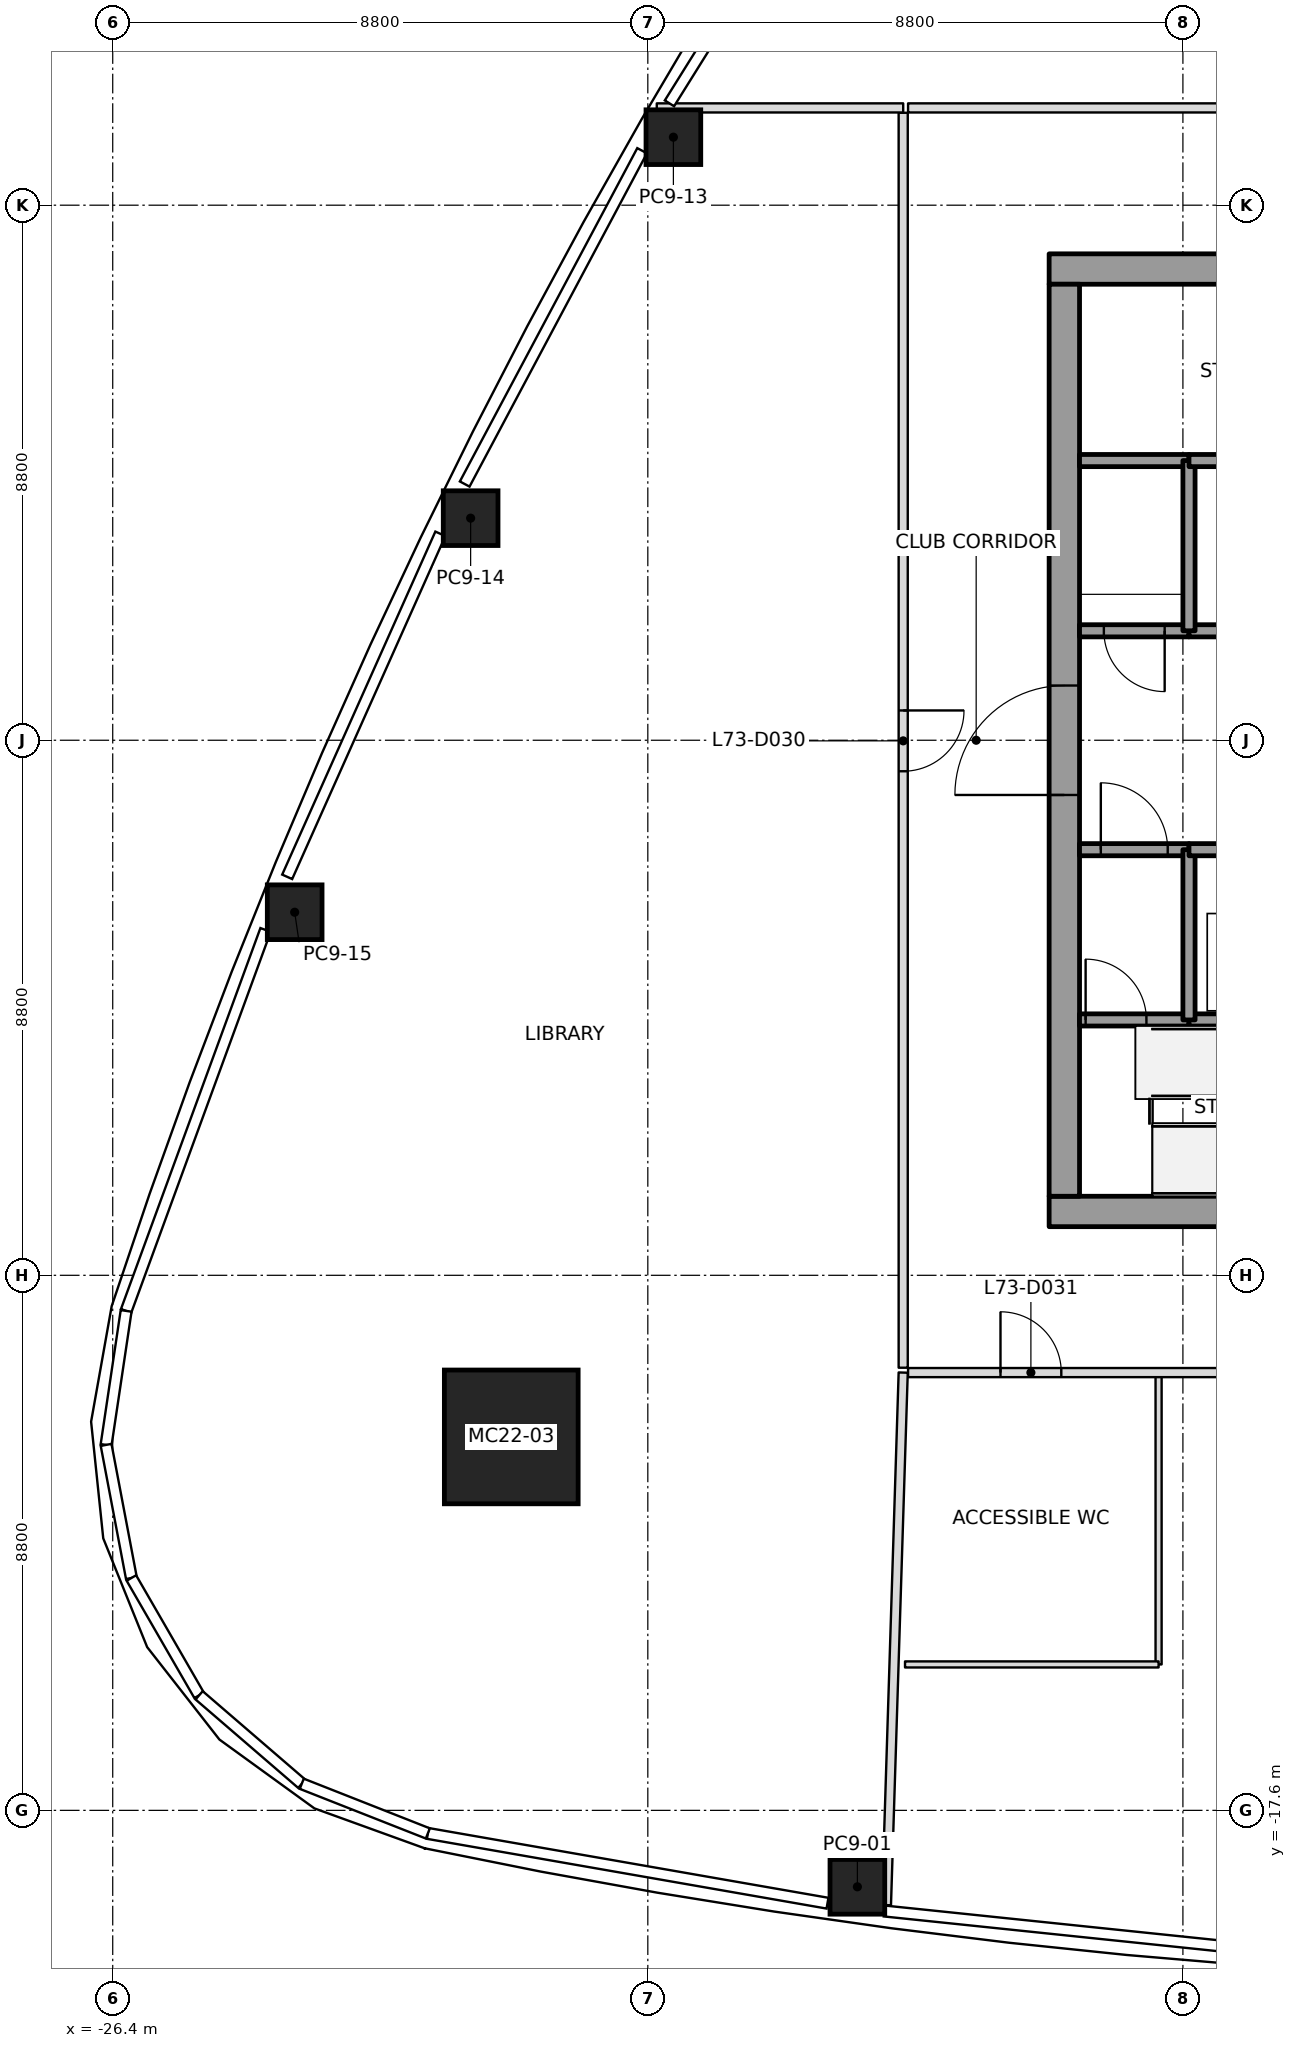
"""IFC4 building model, lengths in metres.
Left out: names, types, materials, properties, quantities, classifications, styles, units other than length and angle.
Written with IfcOpenShell. Run it as: python <this file> out.ifc"""

import sys

from ifc_helpers import new_model, si_unit, direction, frame, frame_2d, origin, origin_2d, place, context, subcontext, project, spatial, rectangle, extrude, clip, halfspace, element, fill, save


model = new_model("IFC4")
c1 = context("Model", 3, precision=1e-05, world=origin(), true_north=direction((0.0, 1.0)))
c2 = subcontext(c1, "Body", "Model", "MODEL_VIEW")
j1 = project(units=[si_unit("LENGTHUNIT", "METRE"), si_unit("PLANEANGLEUNIT", "RADIAN")], contexts=[c1])
p1 = place(None, origin())
s1 = spatial("IfcSite", under=j1, at=p1, CompositionType="ELEMENT")
p2 = place(p1, origin())
s2 = spatial("IfcBuilding", under=s1, at=p2, CompositionType="ELEMENT")
p3 = place(p2, frame((0.0, 0.0, 319.0)))
s3 = spatial("IfcBuildingStorey", under=s2, at=p3, CompositionType="ELEMENT", Elevation=319.0)
p4 = place(p3, frame((-19.846, -11.458, 0.0), z_axis=(0.020475326005, 0.011842241531, 0.999720222032), x_axis=(0.999790358538, -0.000242524599, -0.020473889636)))
e1 = element("IfcColumn", 1, at=p4, inside=s3, PredefinedType="COLUMN", context=c2, shape_type="SweptSolid", body=[
    clip(clip(extrude(rectangle(XDim=2.2, YDim=2.2, at=origin_2d()), origin(), (0.0, 0.0, 1.0), 5.401), halfspace(frame((0.0, 0.0, 0.007)), True)), halfspace(frame((0.0, 0.0, 5.4)), False)),
])
p5 = place(p3, frame((-14.154, -18.857, 0.0), z_axis=(0.012929182019, 0.007685178123, 0.999886880747), x_axis=(-0.990378637615, 0.137884644373, 0.01174644637)))
e2 = element("IfcColumn", 2, at=p5, inside=s3, PredefinedType="COLUMN", context=c2, shape_type="SweptSolid", body=[
    clip(clip(extrude(rectangle(XDim=0.9, YDim=0.9, at=origin_2d()), origin(), (0.0, 0.0, 1.0), 5.401), halfspace(frame((0.0, 0.0, 0.002)), True)), halfspace(frame((0.0, 0.0, 5.4)), False)),
])
p6 = place(p3, frame((-17.179, 9.919, 0.0), z_axis=(0.007324088614, -0.004249779813, 0.999964147906), x_axis=(0.499986589252, 0.866033146147, 1.850476e-05)))
e3 = element("IfcColumn", 3, at=p6, inside=s3, PredefinedType="COLUMN", context=c2, shape_type="SweptSolid", body=[
    clip(extrude(rectangle(XDim=0.9, YDim=0.9, at=origin_2d()), origin(), (0.0, 0.0, 1.0), 5.4), halfspace(frame((0.0, 0.0, 0.001)), True)),
])
p7 = place(p3, frame((-20.514, 3.653, 0.0), z_axis=(0.010398197164, 0.001446705692, 0.999944890751), x_axis=(0.438974783075, 0.898480241879, -0.005864706024)))
e4 = element("IfcColumn", 4, at=p7, inside=s3, PredefinedType="COLUMN", context=c2, shape_type="SweptSolid", body=[
    clip(clip(extrude(rectangle(XDim=0.9, YDim=0.9, at=origin_2d()), origin(), (0.0, 0.0, 1.0), 5.4), halfspace(frame((0.0, 0.0, 0.001)), True)), halfspace(frame((0.0, 0.0, 5.4)), False)),
])
p8 = place(p3, frame((-23.408, -2.829, 0.0), z_axis=(0.013110014455, 0.007323525316, 0.999887240392), x_axis=(0.375868515829, 0.926598952698, -0.011714933535)))
e5 = element("IfcColumn", 5, at=p8, inside=s3, PredefinedType="COLUMN", context=c2, shape_type="SweptSolid", body=[
    clip(clip(extrude(rectangle(XDim=0.9, YDim=0.9, at=origin_2d()), origin(), (0.0, 0.0, 1.0), 5.4), halfspace(frame((0.0, 0.0, 0.002)), True)), halfspace(frame((0.0, 0.0, 5.4)), False)),
])
p9 = place(p3, frame((-11.0, -7.75, 0.0), z_axis=(0.0, 0.0, 1.0), x_axis=(1.0, 0.0, 0.0)))
e6 = element("IfcWall", 6, at=p9, inside=s3, PredefinedType="SHEAR", context=c2, shape_type="SweptSolid", body=[
    extrude(rectangle(XDim=22.0, YDim=0.5, at=frame_2d((11.0, 0.0))), origin(), (0.0, 0.0, 1.0), 5.4),
])
p10 = place(p9, frame((10.45, 0.0, 0.0)))
e7 = element("IfcOpeningElement", 7, at=p10, cuts=e6, PredefinedType="OPENING", context=c2, shape_type="SweptSolid", body=[
    extrude(rectangle(XDim=1.1, YDim=2.1, at=frame_2d((0.55, 1.05))), frame((0.0, 0.25, 0.0), z_axis=(0.0, -1.0, 0.0), x_axis=(1.0, 0.0, 0.0)), (0.0, 0.0, 1.0), 0.5),
])
p11 = place(p3, frame((-11.0, 7.75, 0.0), z_axis=(0.0, 0.0, 1.0), x_axis=(1.0, 0.0, 0.0)))
e8 = element("IfcWall", 8, at=p11, inside=s3, PredefinedType="SHEAR", context=c2, shape_type="SweptSolid", body=[
    extrude(rectangle(XDim=22.0, YDim=0.5, at=frame_2d((11.0, 0.0))), origin(), (0.0, 0.0, 1.0), 5.4),
])
p12 = place(p11, frame((10.45, 0.0, 0.0)))
e9 = element("IfcOpeningElement", 9, at=p12, cuts=e8, PredefinedType="OPENING", context=c2, shape_type="SweptSolid", body=[
    extrude(rectangle(XDim=1.1, YDim=2.1, at=frame_2d((0.55, 1.05))), frame((0.0, 0.25, 0.0), z_axis=(0.0, -1.0, 0.0), x_axis=(1.0, 0.0, 0.0)), (0.0, 0.0, 1.0), 0.5),
])
p13 = place(p3, frame((-10.75, -7.5, 0.0), z_axis=(0.0, 0.0, 1.0), x_axis=(0.0, 1.0, 0.0)))
e10 = element("IfcWall", 10, at=p13, inside=s3, PredefinedType="SHEAR", context=c2, shape_type="SweptSolid", body=[
    extrude(rectangle(XDim=15.0, YDim=0.5, at=frame_2d((7.5, 0.0))), origin(), (0.0, 0.0, 1.0), 5.4),
])
p14 = place(p13, frame((6.6, 0.0, 0.0)))
e11 = element("IfcOpeningElement", 11, at=p14, cuts=e10, PredefinedType="OPENING", context=c2, shape_type="SweptSolid", body=[
    extrude(rectangle(XDim=1.8, YDim=2.1, at=frame_2d((0.9, 1.05))), frame((0.0, 0.25, 0.0), z_axis=(0.0, -1.0, 0.0), x_axis=(1.0, 0.0, 0.0)), (0.0, 0.0, 1.0), 0.5),
])
p15 = place(p3, frame((-10.5, -4.6, 0.0), z_axis=(0.0, 0.0, 1.0), x_axis=(1.0, 0.0, 0.0)))
e12 = element("IfcWall", 12, at=p15, inside=s3, PredefinedType="SOLIDWALL", context=c2, shape_type="SweptSolid", body=[
    extrude(rectangle(XDim=1.8, YDim=0.2, at=frame_2d((0.9, 0.0))), origin(), (0.0, 0.0, 1.0), 5.25),
])
p16 = place(p15, frame((0.1, 0.0, 0.0)))
e13 = element("IfcOpeningElement", 13, at=p16, cuts=e12, PredefinedType="OPENING", context=c2, shape_type="SweptSolid", body=[
    extrude(rectangle(XDim=1.0, YDim=2.1, at=frame_2d((0.5, 1.05))), frame((0.0, 0.1, 0.0), z_axis=(0.0, -1.0, 0.0), x_axis=(1.0, 0.0, 0.0)), (0.0, 0.0, 1.0), 0.2),
])
p17 = place(p3, frame((-10.5, -1.8, 0.0), z_axis=(0.0, 0.0, 1.0), x_axis=(1.0, 0.0, 0.0)))
e14 = element("IfcWall", 14, at=p17, inside=s3, PredefinedType="SOLIDWALL", context=c2, shape_type="SweptSolid", body=[
    extrude(rectangle(XDim=1.8, YDim=0.2, at=frame_2d((0.9, 0.0))), origin(), (0.0, 0.0, 1.0), 5.25),
])
p18 = place(p17, frame((0.35, 0.0, 0.0)))
e15 = element("IfcOpeningElement", 15, at=p18, cuts=e14, PredefinedType="OPENING", context=c2, shape_type="SweptSolid", body=[
    extrude(rectangle(XDim=1.1, YDim=2.1, at=frame_2d((0.55, 1.05))), frame((0.0, 0.1, 0.0), z_axis=(0.0, -1.0, 0.0), x_axis=(1.0, 0.0, 0.0)), (0.0, 0.0, 1.0), 0.2),
])
p19 = place(p3, frame((-8.7, 1.8, 0.0), z_axis=(0.0, 0.0, 1.0), x_axis=(-1.0, 0.0, 0.0)))
e16 = element("IfcWall", 16, at=p19, inside=s3, PredefinedType="SOLIDWALL", context=c2, shape_type="SweptSolid", body=[
    extrude(rectangle(XDim=1.8, YDim=0.2, at=frame_2d((0.9, 0.0))), origin(), (0.0, 0.0, 1.0), 5.25),
])
p20 = place(p19, frame((0.4, 0.0, 0.0)))
e17 = element("IfcOpeningElement", 17, at=p20, cuts=e16, PredefinedType="OPENING", context=c2, shape_type="SweptSolid", body=[
    extrude(rectangle(XDim=1.0, YDim=2.1, at=frame_2d((0.5, 1.05))), frame((0.0, 0.1, 0.0), z_axis=(0.0, -1.0, 0.0), x_axis=(1.0, 0.0, 0.0)), (0.0, 0.0, 1.0), 0.2),
])
p21 = place(p3, frame((-8.7, 4.6, 0.0), z_axis=(0.0, 0.0, 1.0), x_axis=(-1.0, 0.0, 0.0)))
e18 = element("IfcWall", 18, at=p21, inside=s3, PredefinedType="SOLIDWALL", context=c2, shape_type="SweptSolid", body=[
    extrude(rectangle(XDim=1.8, YDim=0.2, at=frame_2d((0.9, 0.0))), origin(), (0.0, 0.0, 1.0), 5.25),
])
p22 = place(p3, frame((-8.7, -4.6, 0.0), z_axis=(0.0, 0.0, 1.0), x_axis=(1.0, 0.0, 0.0)))
e19 = element("IfcWall", 19, at=p22, inside=s3, PredefinedType="SOLIDWALL", context=c2, shape_type="SweptSolid", body=[
    extrude(rectangle(XDim=2.6, YDim=0.2, at=frame_2d((1.3, 0.0))), origin(), (0.0, 0.0, 1.0), 5.25),
])
p23 = place(p3, frame((-8.7, -4.6, 0.0), z_axis=(0.0, 0.0, 1.0), x_axis=(0.0, 1.0, 0.0)))
e20 = element("IfcWall", 20, at=p23, inside=s3, PredefinedType="SOLIDWALL", context=c2, shape_type="SweptSolid", body=[
    extrude(rectangle(XDim=2.8, YDim=0.2, at=frame_2d((1.4, 0.0))), origin(), (0.0, 0.0, 1.0), 5.25),
])
p24 = place(p3, frame((-8.7, -1.8, 0.0), z_axis=(0.0, 0.0, 1.0), x_axis=(1.0, 0.0, 0.0)))
e21 = element("IfcWall", 21, at=p24, inside=s3, PredefinedType="SOLIDWALL", context=c2, shape_type="SweptSolid", body=[
    extrude(rectangle(XDim=2.6, YDim=0.2, at=frame_2d((1.3, 0.0))), origin(), (0.0, 0.0, 1.0), 5.25),
])
p25 = place(p24, frame((0.75, 0.0, 0.0)))
e22 = element("IfcOpeningElement", 22, at=p25, cuts=e21, PredefinedType="OPENING", context=c2, shape_type="SweptSolid", body=[
    extrude(rectangle(XDim=1.1, YDim=2.1, at=frame_2d((0.55, 1.05))), frame((0.0, 0.1, 0.0), z_axis=(0.0, -1.0, 0.0), x_axis=(1.0, 0.0, 0.0)), (0.0, 0.0, 1.0), 0.2),
])
p26 = place(p3, frame((-8.7, 1.8, 0.0), z_axis=(0.0, 0.0, 1.0), x_axis=(1.0, 0.0, 0.0)))
e23 = element("IfcWall", 23, at=p26, inside=s3, PredefinedType="SOLIDWALL", context=c2, shape_type="SweptSolid", body=[
    extrude(rectangle(XDim=5.2, YDim=0.2, at=frame_2d((2.6, 0.0))), origin(), (0.0, 0.0, 1.0), 5.25),
])
p27 = place(p26, frame((2.15, 0.0, 0.0)))
e24 = element("IfcOpeningElement", 24, at=p27, cuts=e23, PredefinedType="OPENING", context=c2, shape_type="SweptSolid", body=[
    extrude(rectangle(XDim=0.9, YDim=2.1, at=frame_2d((0.45, 1.05))), frame((0.0, 0.1, 0.0), z_axis=(0.0, -1.0, 0.0), x_axis=(1.0, 0.0, 0.0)), (0.0, 0.0, 1.0), 0.2),
])
p28 = place(p3, frame((-8.7, 4.6, 0.0), z_axis=(0.0, 0.0, 1.0), x_axis=(0.0, -1.0, 0.0)))
e25 = element("IfcWall", 25, at=p28, inside=s3, PredefinedType="SOLIDWALL", context=c2, shape_type="SweptSolid", body=[
    extrude(rectangle(XDim=2.8, YDim=0.2, at=frame_2d((1.4, 0.0))), origin(), (0.0, 0.0, 1.0), 5.25),
])
p29 = place(p3, frame((-4.3, 4.6, 0.0), z_axis=(0.0, 0.0, 1.0), x_axis=(-1.0, 0.0, 0.0)))
e26 = element("IfcWall", 26, at=p29, inside=s3, PredefinedType="SOLIDWALL", context=c2, shape_type="SweptSolid", body=[
    extrude(rectangle(XDim=4.4, YDim=0.2, at=frame_2d((2.2, 0.0))), origin(), (0.0, 0.0, 1.0), 5.25),
])
p30 = place(p3, frame((-13.4, 10.4, 0.0), z_axis=(0.0, 0.0, 1.0), x_axis=(-1.0, 0.0, 0.0)))
e27 = element("IfcWall", 27, at=p30, inside=s3, PredefinedType="PARTITIONING", context=c2, shape_type="SweptSolid", body=[
    extrude(rectangle(XDim=4.053, YDim=0.15, at=frame_2d((2.026, 0.0))), origin(), (0.0, 0.0, 1.0), 4.533),
])
p31 = place(p3, frame((-13.4, -10.4, 0.0), z_axis=(0.0, 0.0, 1.0), x_axis=(-0.031481767442, -0.999504326313, 0.0)))
e28 = element("IfcWall", 28, at=p31, inside=s3, PredefinedType="PARTITIONING", context=c2, shape_type="SweptSolid", body=[
    extrude(rectangle(XDim=8.763, YDim=0.15, at=frame_2d((4.382, 0.0))), origin(), (0.0, 0.0, 1.0), 4.533),
])
p32 = place(p3, frame((-13.4, 10.32, 0.0), z_axis=(0.0, 0.0, 1.0), x_axis=(0.0, -1.0, 0.0)))
e29 = element("IfcWall", 29, at=p32, inside=s3, PredefinedType="PARTITIONING", context=c2, shape_type="SweptSolid", body=[
    extrude(rectangle(XDim=20.64, YDim=0.15, at=frame_2d((10.32, 0.0))), origin(), (0.0, 0.0, 1.0), 4.538),
])
p33 = place(p32, frame((9.83, 0.0, 0.0)))
e30 = element("IfcOpeningElement", 30, at=p33, cuts=e29, PredefinedType="OPENING", context=c2, shape_type="SweptSolid", body=[
    extrude(rectangle(XDim=1.0, YDim=2.1, at=frame_2d((0.5, 1.05))), frame((0.0, 0.075, 0.0), z_axis=(0.0, -1.0, 0.0), x_axis=(1.0, 0.0, 0.0)), (0.0, 0.0, 1.0), 0.15),
])
p34 = place(p3, frame((-13.32, -10.4, 0.0), z_axis=(0.0, 0.0, 1.0), x_axis=(1.0, 0.0, 0.0)))
e31 = element("IfcWall", 31, at=p34, inside=s3, PredefinedType="PARTITIONING", context=c2, shape_type="SweptSolid", body=[
    extrude(rectangle(XDim=26.64, YDim=0.15, at=frame_2d((13.32, 0.0))), origin(), (0.0, 0.0, 1.0), 4.606),
])
p35 = place(p34, frame((1.52, 0.0, 0.0)))
e32 = element("IfcOpeningElement", 32, at=p35, cuts=e31, PredefinedType="OPENING", context=c2, shape_type="SweptSolid", body=[
    extrude(rectangle(XDim=1.0, YDim=2.1, at=frame_2d((0.5, 1.05))), frame((0.0, 0.075, 0.0), z_axis=(0.0, -1.0, 0.0), x_axis=(1.0, 0.0, 0.0)), (0.0, 0.0, 1.0), 0.15),
])
p36 = place(p34, frame((7.97, 0.0, 0.0)))
e33 = element("IfcOpeningElement", 33, at=p36, cuts=e31, PredefinedType="OPENING", context=c2, shape_type="SweptSolid", body=[
    extrude(rectangle(XDim=1.0, YDim=2.1, at=frame_2d((0.5, 1.05))), frame((0.0, 0.075, 0.0), z_axis=(0.0, -1.0, 0.0), x_axis=(1.0, 0.0, 0.0)), (0.0, 0.0, 1.0), 0.15),
])
p37 = place(p34, frame((18.82, 0.0, 0.0)))
e34 = element("IfcOpeningElement", 34, at=p37, cuts=e31, PredefinedType="OPENING", context=c2, shape_type="SweptSolid", body=[
    extrude(rectangle(XDim=1.8, YDim=2.1, at=frame_2d((0.9, 1.05))), frame((0.0, 0.075, 0.0), z_axis=(0.0, -1.0, 0.0), x_axis=(1.0, 0.0, 0.0)), (0.0, 0.0, 1.0), 0.15),
])
p38 = place(p3, frame((13.32, 10.4, 0.0), z_axis=(0.0, 0.0, 1.0), x_axis=(-1.0, 0.0, 0.0)))
e35 = element("IfcWall", 35, at=p38, inside=s3, PredefinedType="PARTITIONING", context=c2, shape_type="SweptSolid", body=[
    extrude(rectangle(XDim=26.64, YDim=0.15, at=frame_2d((13.32, 0.0))), origin(), (0.0, 0.0, 1.0), 4.538),
])
p39 = place(p38, frame((4.12, 0.0, 0.0)))
e36 = element("IfcOpeningElement", 36, at=p39, cuts=e35, PredefinedType="OPENING", context=c2, shape_type="SweptSolid", body=[
    extrude(rectangle(XDim=1.0, YDim=2.1, at=frame_2d((0.5, 1.05))), frame((0.0, 0.075, 0.0), z_axis=(0.0, -1.0, 0.0), x_axis=(1.0, 0.0, 0.0)), (0.0, 0.0, 1.0), 0.15),
])
p40 = place(p38, frame((0.26, 0.0, 0.0)))
e37 = element("IfcOpeningElement", 37, at=p40, cuts=e35, PredefinedType="OPENING", context=c2, shape_type="SweptSolid", body=[
    extrude(rectangle(XDim=1.8, YDim=2.1, at=frame_2d((0.9, 1.05))), frame((0.0, 0.075, 0.0), z_axis=(0.0, -1.0, 0.0), x_axis=(1.0, 0.0, 0.0)), (0.0, 0.0, 1.0), 0.15),
])
p41 = place(p38, frame((15.53, 0.0, 0.0)))
e38 = element("IfcOpeningElement", 38, at=p41, cuts=e35, PredefinedType="OPENING", context=c2, shape_type="SweptSolid", body=[
    extrude(rectangle(XDim=2.4, YDim=2.1, at=frame_2d((1.2, 1.05))), frame((0.0, 0.075, 0.0), z_axis=(0.0, -1.0, 0.0), x_axis=(1.0, 0.0, 0.0)), (0.0, 0.0, 1.0), 0.15),
])
p42 = place(p3, frame((-9.2, -10.43, 0.0), z_axis=(0.0, 0.0, 1.0), x_axis=(0.0, -1.0, 0.0)))
e39 = element("IfcWall", 39, at=p42, inside=s3, PredefinedType="PARTITIONING", context=c2, shape_type="SweptSolid", body=[
    extrude(rectangle(XDim=4.77, YDim=0.1, at=frame_2d((2.385, 0.0))), origin(), (0.0, 0.0, 1.0), 4.75),
])
p43 = place(p3, frame((-9.2, -15.2, 0.0), z_axis=(0.0, 0.0, 1.0), x_axis=(-1.0, 0.0, 0.0)))
e40 = element("IfcWall", 40, at=p43, inside=s3, PredefinedType="PARTITIONING", context=c2, shape_type="SweptSolid", body=[
    extrude(rectangle(XDim=4.17, YDim=0.1, at=frame_2d((2.085, 0.0))), origin(), (0.0, 0.0, 1.0), 4.606),
])
p44 = place(p33, origin())
e41 = element("IfcDoor", 41, at=p44, inside=s3, OperationType="SINGLE_SWING_RIGHT", PredefinedType="DOOR", context=c2, shape_type="SweptSolid", body=[
    extrude(rectangle(XDim=1.0, YDim=2.1, at=frame_2d((0.5, 1.05))), frame((0.0, 0.025, 0.0), z_axis=(0.0, -1.0, 0.0), x_axis=(1.0, 0.0, 0.0)), (0.0, 0.0, 1.0), 0.05),
])
fill(e30, e41)
p45 = place(p35, origin())
e42 = element("IfcDoor", 42, at=p45, inside=s3, OperationType="SINGLE_SWING_LEFT", PredefinedType="DOOR", context=c2, shape_type="SweptSolid", body=[
    extrude(rectangle(XDim=1.0, YDim=2.1, at=frame_2d((0.5, 1.05))), frame((0.0, 0.025, 0.0), z_axis=(0.0, -1.0, 0.0), x_axis=(1.0, 0.0, 0.0)), (0.0, 0.0, 1.0), 0.05),
])
fill(e32, e42)
p46 = place(p18, origin())
e43 = element("IfcDoor", 43, at=p46, inside=s3, OperationType="SINGLE_SWING_RIGHT", PredefinedType="DOOR", context=c2, shape_type="SweptSolid", body=[
    extrude(rectangle(XDim=1.1, YDim=2.1, at=frame_2d((0.55, 1.05))), frame((0.0, 0.025, 0.0), z_axis=(0.0, -1.0, 0.0), x_axis=(1.0, 0.0, 0.0)), (0.0, 0.0, 1.0), 0.05),
])
fill(e15, e43)
p47 = place(p20, origin())
e44 = element("IfcDoor", 44, at=p47, inside=s3, OperationType="SINGLE_SWING_RIGHT", PredefinedType="DOOR", context=c2, shape_type="SweptSolid", body=[
    extrude(rectangle(XDim=1.0, YDim=2.1, at=frame_2d((0.5, 1.05))), frame((0.0, 0.025, 0.0), z_axis=(0.0, -1.0, 0.0), x_axis=(1.0, 0.0, 0.0)), (0.0, 0.0, 1.0), 0.05),
])
fill(e17, e44)
p48 = place(p16, origin())
e45 = element("IfcDoor", 45, at=p48, inside=s3, OperationType="SINGLE_SWING_LEFT", PredefinedType="DOOR", context=c2, shape_type="SweptSolid", body=[
    extrude(rectangle(XDim=1.0, YDim=2.1, at=frame_2d((0.5, 1.05))), frame((0.0, 0.025, 0.0), z_axis=(0.0, -1.0, 0.0), x_axis=(1.0, 0.0, 0.0)), (0.0, 0.0, 1.0), 0.05),
])
fill(e13, e45)
p49 = place(p14, origin())
e46 = element("IfcDoor", 46, at=p49, inside=s3, OperationType="DOUBLE_DOOR_SINGLE_SWING", PredefinedType="DOOR", context=c2, shape_type="SweptSolid", body=[
    extrude(rectangle(XDim=1.8, YDim=2.1, at=frame_2d((0.9, 1.05))), frame((0.0, 0.025, 0.0), z_axis=(0.0, -1.0, 0.0), x_axis=(1.0, 0.0, 0.0)), (0.0, 0.0, 1.0), 0.05),
])
fill(e11, e46)
save(model, sys.argv[1])
